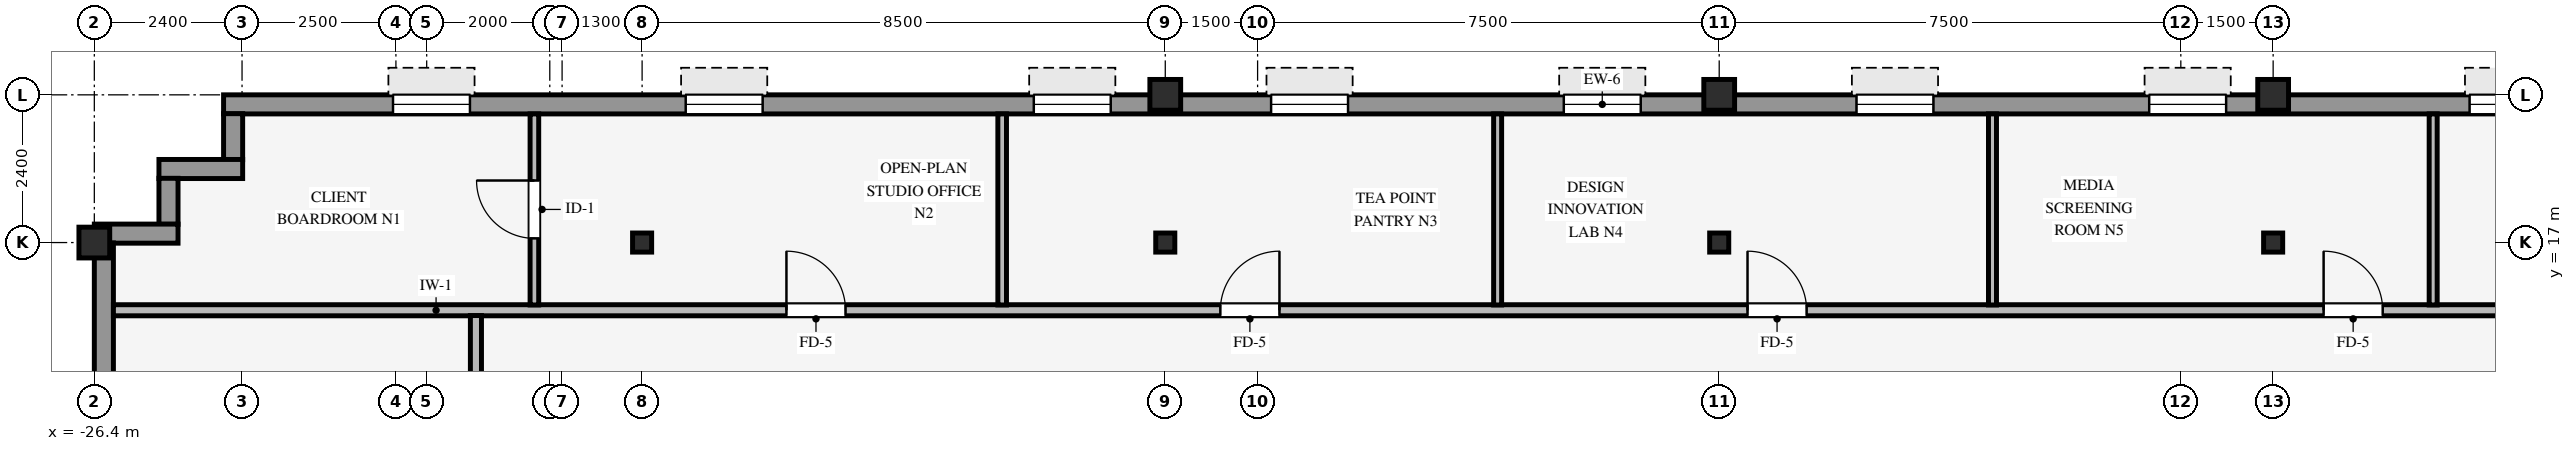
"""IFC4 building model, lengths in metres.
Left out: names, types, materials, properties, quantities, classifications, styles, units other than length and angle.
Written with IfcOpenShell. Run it as: python <this file> out.ifc"""

import sys

from ifc_helpers import new_model, si_unit, direction, frame, frame_2d, origin, origin_2d, place, context, subcontext, project, spatial, rectangle, hollow_rectangle, i_section, extrude, source, transform, mapped, element, fill, save


model = new_model("IFC4")
c1 = context("Model", 3, precision=1e-05, world=origin(), true_north=direction((0.0, 1.0)))
c2 = subcontext(c1, "Body", "Model", "MODEL_VIEW")
j1 = project(units=[si_unit("LENGTHUNIT", "METRE"), si_unit("PLANEANGLEUNIT", "RADIAN")], contexts=[c1])
p1 = place(None, origin())
s1 = spatial("IfcSite", under=j1, at=p1, CompositionType="ELEMENT")
p2 = place(p1, origin())
s2 = spatial("IfcBuilding", under=s1, at=p2, CompositionType="ELEMENT")
p3 = place(p2, frame((0.0, 0.0, 205.5)))
s3 = spatial("IfcBuildingStorey", under=s2, at=p3, CompositionType="ELEMENT", Elevation=205.5)
for number, where, z_axis, x_axis in (
    (1, (-26.4, 17.0, 0.0), (0.0, 0.0, 1.0), (1.0, 0.0, 0.0)),
    (2, (-9.0, 19.4, 0.0), (0.0, 0.0, 1.0), (1.0, 0.0, 0.0)),
    (3, (0.0, 19.4, 0.0), (0.0, 0.0, 1.0), (1.0, 0.0, 0.0)),
    (4, (9.0, 19.4, 0.0), (0.0, 0.0, 1.0), (1.0, 0.0, 0.0)),
):
    element("IfcColumn", number, at=place(p3, frame(where, z_axis=z_axis, x_axis=x_axis)), inside=s3, PredefinedType="COLUMN", context=c2, shape_type="SweptSolid", body=[
        extrude(hollow_rectangle(XDim=0.5, YDim=0.5, WallThickness=0.032, InnerFilletRadius=0.032, OuterFilletRadius=0.064, at=origin_2d()), origin(), (0.0, 0.0, 1.0), 3.25),
    ])
for number, where, z_axis, x_axis in (
    (5, (0.0, 17.0, 0.0), (0.0, 0.0, 1.0), (1.0, 0.0, 0.0)),
    (6, (-17.5, 17.0, 0.0), (0.0, 0.0, 1.0), (1.0, 0.0, 0.0)),
    (7, (-9.0, 17.0, 0.0), (0.0, 0.0, 1.0), (1.0, 0.0, 0.0)),
    (8, (9.0, 17.0, 0.0), (0.0, 0.0, 1.0), (1.0, 0.0, 0.0)),
):
    element("IfcColumn", number, at=place(p3, frame(where, z_axis=z_axis, x_axis=x_axis)), inside=s3, PredefinedType="COLUMN", context=c2, shape_type="SweptSolid", body=[
        extrude(i_section(OverallWidth=0.31, OverallDepth=0.31, WebThickness=0.015, FlangeThickness=0.015, FilletRadius=0.015, at=origin_2d()), origin(), (0.0, 0.0, 1.0), 3.25),
    ])
p4 = place(p3, frame((-24.3, 19.245, 0.0), z_axis=(0.0, 0.0, 1.0), x_axis=(1.0, 0.0, 0.0)))
e9 = element("IfcWall", 9, at=p4, inside=s3, PredefinedType="STANDARD", context=c2, shape_type="SweptSolid", body=[
    extrude(rectangle(XDim=44.8, YDim=0.31, at=frame_2d((22.4, 0.0))), origin(), (0.0, 0.0, 1.0), 2.585),
])
p5 = place(p4, frame((2.753, 0.0, 0.8)))
e10 = element("IfcOpeningElement", 10, at=p5, cuts=e9, PredefinedType="OPENING", context=c2, shape_type="SweptSolid", body=[
    extrude(rectangle(XDim=1.25, YDim=1.52, at=frame_2d((0.625, 0.76))), frame((0.0, 0.165, 0.0), z_axis=(0.0, -1.0, 0.0), x_axis=(1.0, 0.0, 0.0)), (0.0, 0.0, 1.0), 0.33),
])
p6 = place(p4, frame((7.508, 0.0, 0.8)))
e11 = element("IfcOpeningElement", 11, at=p6, cuts=e9, PredefinedType="OPENING", context=c2, shape_type="SweptSolid", body=[
    extrude(rectangle(XDim=1.25, YDim=1.52, at=frame_2d((0.625, 0.76))), frame((0.0, 0.165, 0.0), z_axis=(0.0, -1.0, 0.0), x_axis=(1.0, 0.0, 0.0)), (0.0, 0.0, 1.0), 0.33),
])
p7 = place(p4, frame((13.164, 0.0, 0.8)))
e12 = element("IfcOpeningElement", 12, at=p7, cuts=e9, PredefinedType="OPENING", context=c2, shape_type="SweptSolid", body=[
    extrude(rectangle(XDim=1.25, YDim=1.52, at=frame_2d((0.625, 0.76))), frame((0.0, 0.165, 0.0), z_axis=(0.0, -1.0, 0.0), x_axis=(1.0, 0.0, 0.0)), (0.0, 0.0, 1.0), 0.33),
])
p8 = place(p4, frame((17.019, 0.0, 0.8)))
e13 = element("IfcOpeningElement", 13, at=p8, cuts=e9, PredefinedType="OPENING", context=c2, shape_type="SweptSolid", body=[
    extrude(rectangle(XDim=1.25, YDim=1.52, at=frame_2d((0.625, 0.76))), frame((0.0, 0.165, 0.0), z_axis=(0.0, -1.0, 0.0), x_axis=(1.0, 0.0, 0.0)), (0.0, 0.0, 1.0), 0.33),
])
p9 = place(p4, frame((21.775, 0.0, 0.8)))
e14 = element("IfcOpeningElement", 14, at=p9, cuts=e9, PredefinedType="OPENING", context=c2, shape_type="SweptSolid", body=[
    extrude(rectangle(XDim=1.25, YDim=1.52, at=frame_2d((0.625, 0.76))), frame((0.0, 0.165, 0.0), z_axis=(0.0, -1.0, 0.0), x_axis=(1.0, 0.0, 0.0)), (0.0, 0.0, 1.0), 0.33),
])
p10 = place(p4, frame((26.531, 0.0, 0.8)))
e15 = element("IfcOpeningElement", 15, at=p10, cuts=e9, PredefinedType="OPENING", context=c2, shape_type="SweptSolid", body=[
    extrude(rectangle(XDim=1.25, YDim=1.52, at=frame_2d((0.625, 0.76))), frame((0.0, 0.165, 0.0), z_axis=(0.0, -1.0, 0.0), x_axis=(1.0, 0.0, 0.0)), (0.0, 0.0, 1.0), 0.33),
])
p11 = place(p4, frame((31.286, 0.0, 0.8)))
e16 = element("IfcOpeningElement", 16, at=p11, cuts=e9, PredefinedType="OPENING", context=c2, shape_type="SweptSolid", body=[
    extrude(rectangle(XDim=1.25, YDim=1.52, at=frame_2d((0.625, 0.76))), frame((0.0, 0.165, 0.0), z_axis=(0.0, -1.0, 0.0), x_axis=(1.0, 0.0, 0.0)), (0.0, 0.0, 1.0), 0.33),
])
p12 = place(p4, frame((36.492, 0.0, 0.8)))
e17 = element("IfcOpeningElement", 17, at=p12, cuts=e9, PredefinedType="OPENING", context=c2, shape_type="SweptSolid", body=[
    extrude(rectangle(XDim=1.25, YDim=1.52, at=frame_2d((0.625, 0.76))), frame((0.0, 0.165, 0.0), z_axis=(0.0, -1.0, 0.0), x_axis=(1.0, 0.0, 0.0)), (0.0, 0.0, 1.0), 0.33),
])
p13 = place(p4, frame((40.797, 0.0, 0.8)))
e18 = element("IfcOpeningElement", 18, at=p13, cuts=e9, PredefinedType="OPENING", context=c2, shape_type="SweptSolid", body=[
    extrude(rectangle(XDim=1.25, YDim=1.52, at=frame_2d((0.625, 0.76))), frame((0.0, 0.165, 0.0), z_axis=(0.0, -1.0, 0.0), x_axis=(1.0, 0.0, 0.0)), (0.0, 0.0, 1.0), 0.33),
])
p14 = place(p3, frame((-24.145, 18.346, 0.0), z_axis=(0.0, 0.0, 1.0), x_axis=(0.0, 1.0, 0.0)))
e19 = element("IfcWall", 19, at=p14, inside=s3, PredefinedType="STANDARD", context=c2, shape_type="SweptSolid", body=[
    extrude(rectangle(XDim=0.748, YDim=0.31, at=frame_2d((0.374, 0.0))), origin(), (0.0, 0.0, 1.0), 2.696),
])
p15 = place(p3, frame((-25.35, 18.195, 0.0), z_axis=(0.0, 0.0, 1.0), x_axis=(1.0, 0.0, 0.0)))
e20 = element("IfcWall", 20, at=p15, inside=s3, PredefinedType="STANDARD", context=c2, shape_type="SweptSolid", body=[
    extrude(rectangle(XDim=1.36, YDim=0.31, at=frame_2d((0.68, 0.0))), origin(), (0.0, 0.0, 1.0), 2.696),
])
p16 = place(p3, frame((-25.195, 17.296, 0.0), z_axis=(0.0, 0.0, 1.0), x_axis=(0.0, 1.0, 0.0)))
e21 = element("IfcWall", 21, at=p16, inside=s3, PredefinedType="STANDARD", context=c2, shape_type="SweptSolid", body=[
    extrude(rectangle(XDim=0.748, YDim=0.31, at=frame_2d((0.374, 0.0))), origin(), (0.0, 0.0, 1.0), 2.696),
])
p17 = place(p3, frame((-26.4, 17.145, 0.0), z_axis=(0.0, 0.0, 1.0), x_axis=(1.0, 0.0, 0.0)))
e22 = element("IfcWall", 22, at=p17, inside=s3, PredefinedType="STANDARD", context=c2, shape_type="SweptSolid", body=[
    extrude(rectangle(XDim=1.36, YDim=0.31, at=frame_2d((0.68, 0.0))), origin(), (0.0, 0.0, 1.0), 2.696),
])
p18 = place(p3, frame((-26.245, -20.794, 0.0), z_axis=(0.0, 0.0, 1.0), x_axis=(0.0, 1.0, 0.0)))
e23 = element("IfcWall", 23, at=p18, inside=s3, PredefinedType="STANDARD", context=c2, shape_type="SweptSolid", body=[
    extrude(rectangle(XDim=37.788, YDim=0.31, at=frame_2d((18.894, 0.0))), origin(), (0.0, 0.0, 1.0), 2.585),
])
p19 = place(p18, frame((7.644, 0.0, 0.8)))
e24 = element("IfcOpeningElement", 24, at=p19, cuts=e23, PredefinedType="OPENING", context=c2, shape_type="SweptSolid", body=[
    extrude(rectangle(XDim=2.05, YDim=1.52, at=frame_2d((1.025, 0.76))), frame((0.0, 0.165, 0.0), z_axis=(0.0, -1.0, 0.0), x_axis=(1.0, 0.0, 0.0)), (0.0, 0.0, 1.0), 0.33),
])
p20 = place(p18, frame((13.206, 0.0, 0.8)))
e25 = element("IfcOpeningElement", 25, at=p20, cuts=e23, PredefinedType="OPENING", context=c2, shape_type="SweptSolid", body=[
    extrude(rectangle(XDim=2.05, YDim=1.52, at=frame_2d((1.025, 0.76))), frame((0.0, 0.165, 0.0), z_axis=(0.0, -1.0, 0.0), x_axis=(1.0, 0.0, 0.0)), (0.0, 0.0, 1.0), 0.33),
])
p21 = place(p18, frame((17.869, 0.0, 0.8)))
e26 = element("IfcOpeningElement", 26, at=p21, cuts=e23, PredefinedType="OPENING", context=c2, shape_type="SweptSolid", body=[
    extrude(rectangle(XDim=2.05, YDim=1.52, at=frame_2d((1.025, 0.76))), frame((0.0, 0.165, 0.0), z_axis=(0.0, -1.0, 0.0), x_axis=(1.0, 0.0, 0.0)), (0.0, 0.0, 1.0), 0.33),
])
p22 = place(p18, frame((22.982, 0.0, 0.8)))
e27 = element("IfcOpeningElement", 27, at=p22, cuts=e23, PredefinedType="OPENING", context=c2, shape_type="SweptSolid", body=[
    extrude(rectangle(XDim=2.05, YDim=1.52, at=frame_2d((1.025, 0.76))), frame((0.0, 0.165, 0.0), z_axis=(0.0, -1.0, 0.0), x_axis=(1.0, 0.0, 0.0)), (0.0, 0.0, 1.0), 0.33),
])
p23 = place(p18, frame((33.207, 0.0, 0.8)))
e28 = element("IfcOpeningElement", 28, at=p23, cuts=e23, PredefinedType="OPENING", context=c2, shape_type="SweptSolid", body=[
    extrude(rectangle(XDim=2.05, YDim=1.52, at=frame_2d((1.025, 0.76))), frame((0.0, 0.165, 0.0), z_axis=(0.0, -1.0, 0.0), x_axis=(1.0, 0.0, 0.0)), (0.0, 0.0, 1.0), 0.33),
])
p24 = place(p3, frame((-26.09, 15.9, 0.0), z_axis=(0.0, 0.0, 1.0), x_axis=(1.0, 0.0, 0.0)))
e29 = element("IfcWall", 29, at=p24, inside=s3, PredefinedType="PARTITIONING", context=c2, shape_type="SweptSolid", body=[
    extrude(rectangle(XDim=48.38, YDim=0.18, at=frame_2d((24.19, 0.0))), origin(), (0.0, 0.0, 1.0), 3.24),
])
p25 = place(p24, frame((41.81, 0.0, 0.0)))
e30 = element("IfcOpeningElement", 30, at=p25, cuts=e29, PredefinedType="OPENING", context=c2, shape_type="SweptSolid", body=[
    extrude(rectangle(XDim=0.96, YDim=2.1, at=frame_2d((0.48, 1.05))), frame((0.0, 0.1, 0.0), z_axis=(0.0, -1.0, 0.0), x_axis=(1.0, 0.0, 0.0)), (0.0, 0.0, 1.0), 0.2),
])
p26 = place(p24, frame((17.985, 0.0, 0.0)))
e31 = element("IfcOpeningElement", 31, at=p26, cuts=e29, PredefinedType="OPENING", context=c2, shape_type="SweptSolid", body=[
    extrude(rectangle(XDim=0.96, YDim=2.1, at=frame_2d((0.48, 1.05))), frame((0.0, 0.1, 0.0), z_axis=(0.0, -1.0, 0.0), x_axis=(1.0, 0.0, 0.0)), (0.0, 0.0, 1.0), 0.2),
])
p27 = place(p24, frame((26.55, 0.0, 0.0)))
e32 = element("IfcOpeningElement", 32, at=p27, cuts=e29, PredefinedType="OPENING", context=c2, shape_type="SweptSolid", body=[
    extrude(rectangle(XDim=0.96, YDim=2.1, at=frame_2d((0.48, 1.05))), frame((0.0, 0.1, 0.0), z_axis=(0.0, -1.0, 0.0), x_axis=(1.0, 0.0, 0.0)), (0.0, 0.0, 1.0), 0.2),
])
p28 = place(p24, frame((10.935, 0.0, 0.0)))
e33 = element("IfcOpeningElement", 33, at=p28, cuts=e29, PredefinedType="OPENING", context=c2, shape_type="SweptSolid", body=[
    extrude(rectangle(XDim=0.96, YDim=2.1, at=frame_2d((0.48, 1.05))), frame((0.0, 0.1, 0.0), z_axis=(0.0, -1.0, 0.0), x_axis=(1.0, 0.0, 0.0)), (0.0, 0.0, 1.0), 0.2),
])
p29 = place(p24, frame((35.91, 0.0, 0.0)))
e34 = element("IfcOpeningElement", 34, at=p29, cuts=e29, PredefinedType="OPENING", context=c2, shape_type="SweptSolid", body=[
    extrude(rectangle(XDim=0.96, YDim=2.1, at=frame_2d((0.48, 1.05))), frame((0.0, 0.1, 0.0), z_axis=(0.0, -1.0, 0.0), x_axis=(1.0, 0.0, 0.0)), (0.0, 0.0, 1.0), 0.2),
])
p30 = place(p3, frame((-20.2, -15.814, 0.0), z_axis=(0.0, 0.0, 1.0), x_axis=(0.0, 1.0, 0.0)))
e35 = element("IfcWall", 35, at=p30, inside=s3, PredefinedType="PARTITIONING", context=c2, shape_type="SweptSolid", body=[
    extrude(rectangle(XDim=31.628, YDim=0.18, at=frame_2d((15.814, 0.0))), origin(), (0.0, 0.0, 1.0), 3.24),
])
p31 = place(p30, frame((11.434, 0.0, 0.0)))
e36 = element("IfcOpeningElement", 36, at=p31, cuts=e35, PredefinedType="OPENING", context=c2, shape_type="SweptSolid", body=[
    extrude(rectangle(XDim=0.96, YDim=2.1, at=frame_2d((0.48, 1.05))), frame((0.0, 0.1, 0.0), z_axis=(0.0, -1.0, 0.0), x_axis=(1.0, 0.0, 0.0)), (0.0, 0.0, 1.0), 0.2),
])
p32 = place(p30, frame((19.634, 0.0, 0.0)))
e37 = element("IfcOpeningElement", 37, at=p32, cuts=e35, PredefinedType="OPENING", context=c2, shape_type="SweptSolid", body=[
    extrude(rectangle(XDim=0.96, YDim=2.1, at=frame_2d((0.48, 1.05))), frame((0.0, 0.1, 0.0), z_axis=(0.0, -1.0, 0.0), x_axis=(1.0, 0.0, 0.0)), (0.0, 0.0, 1.0), 0.2),
])
p33 = place(p30, frame((4.484, 0.0, 0.0)))
e38 = element("IfcOpeningElement", 38, at=p33, cuts=e35, PredefinedType="OPENING", context=c2, shape_type="SweptSolid", body=[
    extrude(rectangle(XDim=0.96, YDim=2.1, at=frame_2d((0.48, 1.05))), frame((0.0, 0.1, 0.0), z_axis=(0.0, -1.0, 0.0), x_axis=(1.0, 0.0, 0.0)), (0.0, 0.0, 1.0), 0.2),
])
p34 = place(p30, frame((26.184, 0.0, 0.0)))
e39 = element("IfcOpeningElement", 39, at=p34, cuts=e35, PredefinedType="OPENING", context=c2, shape_type="SweptSolid", body=[
    extrude(rectangle(XDim=0.96, YDim=2.1, at=frame_2d((0.48, 1.05))), frame((0.0, 0.1, 0.0), z_axis=(0.0, -1.0, 0.0), x_axis=(1.0, 0.0, 0.0)), (0.0, 0.0, 1.0), 0.2),
])
p35 = place(p3, frame((-19.25, 15.986, 0.0), z_axis=(0.0, 0.0, 1.0), x_axis=(0.0, 1.0, 0.0)))
e40 = element("IfcWall", 40, at=p35, inside=s3, PredefinedType="PARTITIONING", context=c2, shape_type="SweptSolid", body=[
    extrude(rectangle(XDim=3.104, YDim=0.14, at=frame_2d((1.552, 0.0))), origin(), (0.0, 0.0, 1.0), 3.24),
])
p36 = place(p35, frame((1.082, 0.0, 0.0)))
e41 = element("IfcOpeningElement", 41, at=p36, cuts=e40, PredefinedType="OPENING", context=c2, shape_type="SweptSolid", body=[
    extrude(rectangle(XDim=0.94, YDim=2.1, at=frame_2d((0.47, 1.05))), frame((0.0, 0.08, 0.0), z_axis=(0.0, -1.0, 0.0), x_axis=(1.0, 0.0, 0.0)), (0.0, 0.0, 1.0), 0.16),
])
p37 = place(p3, frame((-11.65, 15.986, 0.0), z_axis=(0.0, 0.0, 1.0), x_axis=(0.0, 1.0, 0.0)))
e42 = element("IfcWall", 42, at=p37, inside=s3, PredefinedType="PARTITIONING", context=c2, shape_type="SweptSolid", body=[
    extrude(rectangle(XDim=3.104, YDim=0.14, at=frame_2d((1.552, 0.0))), origin(), (0.0, 0.0, 1.0), 3.24),
])
for number, where, z_axis, x_axis in (
    (43, (-3.6, 15.986, 0.0), (0.0, 0.0, 1.0), (0.0, 1.0, 0.0)),
    (44, (4.44, 15.986, 0.0), (0.0, 0.0, 1.0), (0.0, 1.0, 0.0)),
    (45, (11.6, 15.986, 0.0), (0.0, 0.0, 1.0), (0.0, 1.0, 0.0)),
):
    element("IfcWall", number, at=place(p3, frame(where, z_axis=z_axis, x_axis=x_axis)), inside=s3, PredefinedType="PARTITIONING", context=c2, shape_type="SweptSolid", body=[
        extrude(rectangle(XDim=3.104, YDim=0.13, at=frame_2d((1.552, 0.0))), origin(), (0.0, 0.0, 1.0), 3.24),
    ])
m1 = source(origin(), c2, "Body", "SweptSolid", [
    extrude(rectangle(XDim=1.25, YDim=1.52, at=frame_2d((0.625, 0.76))), frame((0.0, 0.03, 0.0), z_axis=(0.0, -1.0, 0.0), x_axis=(1.0, 0.0, 0.0)), (0.0, 0.0, 1.0), 0.06),
])
p38 = place(p5, origin())
e46 = element("IfcWindow", 46, at=p38, inside=s3, PartitioningType="SINGLE_PANEL", PredefinedType="WINDOW", context=c2, shape_type="MappedRepresentation", body=[
    mapped(m1, transform((0.0, 0.0, 0.0), scale=1.0)),
])
fill(e10, e46)
p39 = place(p6, origin())
e47 = element("IfcWindow", 47, at=p39, inside=s3, PartitioningType="SINGLE_PANEL", PredefinedType="WINDOW", context=c2, shape_type="MappedRepresentation", body=[
    mapped(m1, transform((0.0, 0.0, 0.0), scale=1.0)),
])
fill(e11, e47)
p40 = place(p7, origin())
e48 = element("IfcWindow", 48, at=p40, inside=s3, PartitioningType="SINGLE_PANEL", PredefinedType="WINDOW", context=c2, shape_type="MappedRepresentation", body=[
    mapped(m1, transform((0.0, 0.0, 0.0), scale=1.0)),
])
fill(e12, e48)
p41 = place(p8, origin())
e49 = element("IfcWindow", 49, at=p41, inside=s3, PartitioningType="SINGLE_PANEL", PredefinedType="WINDOW", context=c2, shape_type="MappedRepresentation", body=[
    mapped(m1, transform((0.0, 0.0, 0.0), scale=1.0)),
])
fill(e13, e49)
p42 = place(p9, origin())
e50 = element("IfcWindow", 50, at=p42, inside=s3, PartitioningType="SINGLE_PANEL", PredefinedType="WINDOW", context=c2, shape_type="MappedRepresentation", body=[
    mapped(m1, transform((0.0, 0.0, 0.0), scale=1.0)),
])
fill(e14, e50)
p43 = place(p10, origin())
e51 = element("IfcWindow", 51, at=p43, inside=s3, PartitioningType="SINGLE_PANEL", PredefinedType="WINDOW", context=c2, shape_type="MappedRepresentation", body=[
    mapped(m1, transform((0.0, 0.0, 0.0), scale=1.0)),
])
fill(e15, e51)
p44 = place(p11, origin())
e52 = element("IfcWindow", 52, at=p44, inside=s3, PartitioningType="SINGLE_PANEL", PredefinedType="WINDOW", context=c2, shape_type="MappedRepresentation", body=[
    mapped(m1, transform((0.0, 0.0, 0.0), scale=1.0)),
])
fill(e16, e52)
p45 = place(p12, origin())
e53 = element("IfcWindow", 53, at=p45, inside=s3, PartitioningType="SINGLE_PANEL", PredefinedType="WINDOW", context=c2, shape_type="MappedRepresentation", body=[
    mapped(m1, transform((0.0, 0.0, 0.0), scale=1.0)),
])
fill(e17, e53)
m2 = source(origin(), c2, "Body", "SweptSolid", [
    extrude(rectangle(XDim=0.96, YDim=2.1, at=frame_2d((0.48, 1.05))), frame((0.0, 0.025, 0.0), z_axis=(0.0, -1.0, 0.0), x_axis=(1.0, 0.0, 0.0)), (0.0, 0.0, 1.0), 0.05),
])
p46 = place(p26, origin())
e54 = element("IfcDoor", 54, at=p46, inside=s3, OperationType="SINGLE_SWING_RIGHT", PredefinedType="DOOR", context=c2, shape_type="MappedRepresentation", body=[
    mapped(m2, transform((0.0, 0.0, 0.0), scale=1.0)),
])
fill(e31, e54)
p47 = place(p27, origin())
e55 = element("IfcDoor", 55, at=p47, inside=s3, OperationType="SINGLE_SWING_LEFT", PredefinedType="DOOR", context=c2, shape_type="MappedRepresentation", body=[
    mapped(m2, transform((0.0, 0.0, 0.0), scale=1.0)),
])
fill(e32, e55)
p48 = place(p28, origin())
e56 = element("IfcDoor", 56, at=p48, inside=s3, OperationType="SINGLE_SWING_LEFT", PredefinedType="DOOR", context=c2, shape_type="MappedRepresentation", body=[
    mapped(m2, transform((0.0, 0.0, 0.0), scale=1.0)),
])
fill(e33, e56)
p49 = place(p29, origin())
e57 = element("IfcDoor", 57, at=p49, inside=s3, OperationType="SINGLE_SWING_LEFT", PredefinedType="DOOR", context=c2, shape_type="MappedRepresentation", body=[
    mapped(m2, transform((0.0, 0.0, 0.0), scale=1.0)),
])
fill(e34, e57)
m3 = source(origin(), c2, "Body", "SweptSolid", [
    extrude(rectangle(XDim=0.94, YDim=2.1, at=frame_2d((0.47, 1.05))), frame((0.0, 0.025, 0.0), z_axis=(0.0, -1.0, 0.0), x_axis=(1.0, 0.0, 0.0)), (0.0, 0.0, 1.0), 0.05),
])
p50 = place(p36, origin())
e58 = element("IfcDoor", 58, at=p50, inside=s3, OperationType="SINGLE_SWING_RIGHT", PredefinedType="DOOR", context=c2, shape_type="MappedRepresentation", body=[
    mapped(m3, transform((0.0, 0.0, 0.0), scale=1.0)),
])
fill(e41, e58)
save(model, sys.argv[1])
